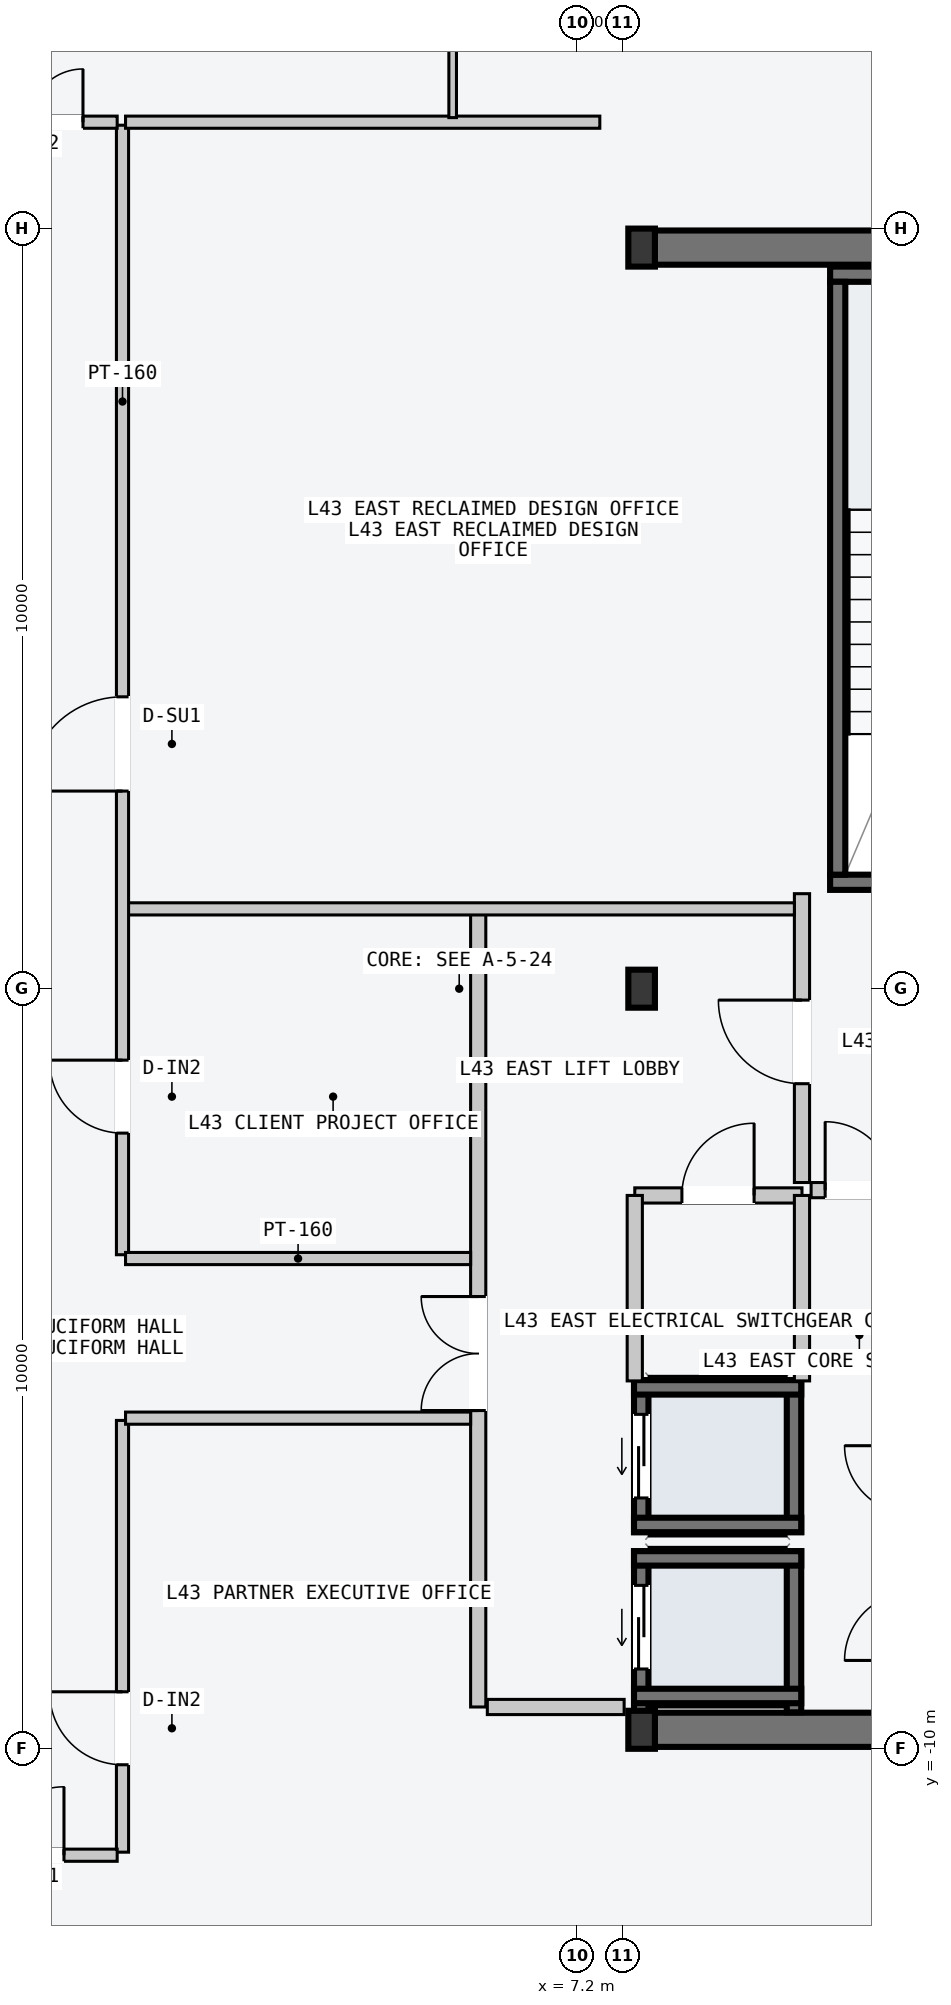
"""IFC4 building model, lengths in metres.
Left out: names, types, materials, properties, quantities, classifications, styles, units other than length and angle.
Written with IfcOpenShell. Run it as: python <this file> out.ifc"""

import sys

from ifc_helpers import new_model, si_unit, direction, frame, frame_2d, origin, origin_2d, place, context, subcontext, project, spatial, rectangle, i_section, extrude, element, fill, save


model = new_model("IFC4")
c1 = context("Model", 3, precision=1e-05, world=origin(), true_north=direction((0.0, 1.0)))
c2 = subcontext(c1, "Body", "Model", "MODEL_VIEW")
j1 = project(units=[si_unit("LENGTHUNIT", "METRE"), si_unit("PLANEANGLEUNIT", "RADIAN")], contexts=[c1])
p1 = place(None, origin())
s1 = spatial("IfcSite", under=j1, at=p1, CompositionType="ELEMENT")
p2 = place(p1, origin())
s2 = spatial("IfcBuilding", under=s1, at=p2, CompositionType="ELEMENT")
p3 = place(p2, frame((0.0, 0.0, 165.9)))
s3 = spatial("IfcBuildingStorey", under=s2, at=p3, CompositionType="ELEMENT", Elevation=165.9)
for number, where, z_axis, x_axis in (
    (1, (8.07, -9.75, -0.2), (0.0, 0.0, 1.0), (1.0, 0.0, 0.0)),
    (2, (8.07, 9.75, -0.2), (0.0, 0.0, 1.0), (1.0, 0.0, 0.0)),
):
    element("IfcWall", number, at=place(p3, frame(where, z_axis=z_axis, x_axis=x_axis)), inside=s3, PredefinedType="SHEAR", context=c2, shape_type="SweptSolid", body=[
        extrude(rectangle(XDim=6.46, YDim=0.45, at=frame_2d((3.23, 0.0))), origin(), (0.0, 0.0, 1.0), 3.6),
    ])
p4 = place(p3, frame((10.53, 1.4, -0.2), z_axis=(0.0, 0.0, 1.0), x_axis=(1.0, 0.0, 0.0)))
e3 = element("IfcWall", 3, at=p4, inside=s3, PredefinedType="SOLIDWALL", context=c2, shape_type="SweptSolid", body=[
    extrude(rectangle(XDim=3.72, YDim=0.2, at=frame_2d((1.86, 0.0))), origin(), (0.0, 0.0, 1.0), 3.6),
])
p5 = place(p4, frame((1.5, 0.0, 0.2)))
e4 = element("IfcOpeningElement", 4, at=p5, cuts=e3, PredefinedType="OPENING", context=c2, shape_type="SweptSolid", body=[
    extrude(rectangle(XDim=1.12, YDim=2.18, at=frame_2d((0.56, 1.09))), frame((0.0, 0.11, 0.0), z_axis=(0.0, -1.0, 0.0), x_axis=(1.0, 0.0, 0.0)), (0.0, 0.0, 1.0), 0.22),
])
p6 = place(p3, frame((10.53, 9.4, -0.2), z_axis=(0.0, 0.0, 1.0), x_axis=(1.0, 0.0, 0.0)))
e5 = element("IfcWall", 5, at=p6, inside=s3, PredefinedType="SOLIDWALL", context=c2, shape_type="SweptSolid", body=[
    extrude(rectangle(XDim=3.72, YDim=0.2, at=frame_2d((1.86, 0.0))), origin(), (0.0, 0.0, 1.0), 3.6),
])
p7 = place(p3, frame((10.63, 1.5, -0.2), z_axis=(0.0, 0.0, 1.0), x_axis=(0.0, 1.0, 0.0)))
e6 = element("IfcWall", 6, at=p7, inside=s3, PredefinedType="SOLIDWALL", context=c2, shape_type="SweptSolid", body=[
    extrude(rectangle(XDim=7.8, YDim=0.2, at=frame_2d((3.9, 0.0))), origin(), (0.0, 0.0, 1.0), 3.6),
])
for number, where, z_axis, x_axis in (
    (7, (8.05, -9.75, 0.0), (0.0, 0.0, 1.0), (1.0, 0.0, 0.0)),
    (8, (8.05, 0.0, 0.0), (0.0, 0.0, 1.0), (1.0, 0.0, 0.0)),
    (9, (8.05, 9.75, 0.0), (0.0, 0.0, 1.0), (1.0, 0.0, 0.0)),
):
    element("IfcColumn", number, at=place(p3, frame(where, z_axis=z_axis, x_axis=x_axis)), inside=s3, PredefinedType="COLUMN", context=c2, shape_type="SweptSolid", body=[
        extrude(i_section(OverallWidth=0.35, OverallDepth=0.5, WebThickness=0.02, FlangeThickness=0.032, at=origin_2d()), origin(), (0.0, 0.0, 1.0), 3.6),
    ])
p8 = place(p3, frame((8.045, -9.52, -0.2), z_axis=(0.0, 0.0, 1.0), x_axis=(0.0, 1.0, 0.0)))
e10 = element("IfcWall", 10, at=p8, inside=s3, PredefinedType="SOLIDWALL", context=c2, shape_type="SweptSolid", body=[
    extrude(rectangle(XDim=2.12, YDim=0.19, at=frame_2d((1.06, 0.0))), origin(), (0.0, 0.0, 1.0), 3.6),
])
p9 = place(p8, frame((0.57, 0.0, 0.2)))
e11 = element("IfcOpeningElement", 11, at=p9, cuts=e10, PredefinedType="OPENING", context=c2, shape_type="SweptSolid", body=[
    extrude(rectangle(XDim=1.1, YDim=2.2, at=frame_2d((0.55, 1.1))), frame((0.0, 0.105, 0.0), z_axis=(0.0, -1.0, 0.0), x_axis=(1.0, 0.0, 0.0)), (0.0, 0.0, 1.0), 0.21),
])
p10 = place(p3, frame((10.055, -9.52, -0.2), z_axis=(0.0, 0.0, 1.0), x_axis=(0.0, 1.0, 0.0)))
e12 = element("IfcWall", 12, at=p10, inside=s3, PredefinedType="SOLIDWALL", context=c2, shape_type="SweptSolid", body=[
    extrude(rectangle(XDim=2.12, YDim=0.19, at=frame_2d((1.06, 0.0))), origin(), (0.0, 0.0, 1.0), 3.6),
])
for number, where, z_axis, x_axis in (
    (13, (7.95, -7.495, -0.2), (0.0, 0.0, 1.0), (1.0, 0.0, 0.0)),
    (14, (7.95, -9.305, -0.2), (0.0, 0.0, 1.0), (1.0, 0.0, 0.0)),
):
    element("IfcWall", number, at=place(p3, frame(where, z_axis=z_axis, x_axis=x_axis)), inside=s3, PredefinedType="SOLIDWALL", context=c2, shape_type="SweptSolid", body=[
        extrude(rectangle(XDim=2.2, YDim=0.19, at=frame_2d((1.1, 0.0))), origin(), (0.0, 0.0, 1.0), 3.6),
    ])
p11 = place(p3, frame((8.045, -7.15, -0.2), z_axis=(0.0, 0.0, 1.0), x_axis=(0.0, 1.0, 0.0)))
e15 = element("IfcWall", 15, at=p11, inside=s3, PredefinedType="SOLIDWALL", context=c2, shape_type="SweptSolid", body=[
    extrude(rectangle(XDim=2.0, YDim=0.19, at=frame_2d((1.0, 0.0))), origin(), (0.0, 0.0, 1.0), 3.6),
])
p12 = place(p11, frame((0.45, 0.0, 0.2)))
e16 = element("IfcOpeningElement", 16, at=p12, cuts=e15, PredefinedType="OPENING", context=c2, shape_type="SweptSolid", body=[
    extrude(rectangle(XDim=1.1, YDim=2.2, at=frame_2d((0.55, 1.1))), frame((0.0, 0.105, 0.0), z_axis=(0.0, -1.0, 0.0), x_axis=(1.0, 0.0, 0.0)), (0.0, 0.0, 1.0), 0.21),
])
p13 = place(p3, frame((10.055, -7.15, -0.2), z_axis=(0.0, 0.0, 1.0), x_axis=(0.0, 1.0, 0.0)))
e17 = element("IfcWall", 17, at=p13, inside=s3, PredefinedType="SOLIDWALL", context=c2, shape_type="SweptSolid", body=[
    extrude(rectangle(XDim=2.0, YDim=0.19, at=frame_2d((1.0, 0.0))), origin(), (0.0, 0.0, 1.0), 3.6),
])
for number, where, z_axis, x_axis in (
    (18, (7.95, -5.245, -0.2), (0.0, 0.0, 1.0), (1.0, 0.0, 0.0)),
    (19, (7.95, -7.055, -0.2), (0.0, 0.0, 1.0), (1.0, 0.0, 0.0)),
):
    element("IfcWall", number, at=place(p3, frame(where, z_axis=z_axis, x_axis=x_axis)), inside=s3, PredefinedType="SOLIDWALL", context=c2, shape_type="SweptSolid", body=[
        extrude(rectangle(XDim=2.2, YDim=0.19, at=frame_2d((1.1, 0.0))), origin(), (0.0, 0.0, 1.0), 3.6),
    ])
p14 = place(p3, frame((5.9, -9.45, 0.0), z_axis=(0.0, 0.0, 1.0), x_axis=(0.0, 1.0, 0.0)))
e20 = element("IfcWall", 20, at=p14, inside=s3, PredefinedType="PARTITIONING", context=c2, shape_type="SweptSolid", body=[
    extrude(rectangle(XDim=10.5, YDim=0.2, at=frame_2d((5.25, 0.0))), origin(), (0.0, 0.0, 1.0), 3.4),
])
p15 = place(p14, frame((3.9, 0.0, 0.0)))
e21 = element("IfcOpeningElement", 21, at=p15, cuts=e20, PredefinedType="OPENING", context=c2, shape_type="SweptSolid", body=[
    extrude(rectangle(XDim=1.5, YDim=2.2, at=frame_2d((0.75, 1.1))), frame((0.0, 0.11, 0.0), z_axis=(0.0, -1.0, 0.0), x_axis=(1.0, 0.0, 0.0)), (0.0, 0.0, 1.0), 0.22),
])
p16 = place(p3, frame((6.02, -9.45, 0.0), z_axis=(0.0, 0.0, 1.0), x_axis=(1.0, 0.0, 0.0)))
e22 = element("IfcWall", 22, at=p16, inside=s3, PredefinedType="PARTITIONING", context=c2, shape_type="SweptSolid", body=[
    extrude(rectangle(XDim=1.8, YDim=0.2, at=frame_2d((0.9, 0.0))), origin(), (0.0, 0.0, 1.0), 3.4),
])
p17 = place(p3, frame((10.16, -2.55, 0.0), z_axis=(0.0, 0.0, 1.0), x_axis=(0.0, 1.0, 0.0)))
e23 = element("IfcWall", 23, at=p17, inside=s3, PredefinedType="PARTITIONING", context=c2, shape_type="SweptSolid", body=[
    extrude(rectangle(XDim=3.8, YDim=0.2, at=frame_2d((1.9, 0.0))), origin(), (0.0, 0.0, 1.0), 3.4),
])
p18 = place(p17, frame((1.3, 0.0, 0.0)))
e24 = element("IfcOpeningElement", 24, at=p18, cuts=e23, PredefinedType="OPENING", context=c2, shape_type="SweptSolid", body=[
    extrude(rectangle(XDim=1.1, YDim=2.15, at=frame_2d((0.55, 1.075))), frame((0.0, 0.11, 0.0), z_axis=(0.0, -1.0, 0.0), x_axis=(1.0, 0.0, 0.0)), (0.0, 0.0, 1.0), 0.22),
])
p19 = place(p3, frame((10.28, -2.65, 0.0), z_axis=(0.0, 0.0, 1.0), x_axis=(1.0, 0.0, 0.0)))
e25 = element("IfcWall", 25, at=p19, inside=s3, PredefinedType="PARTITIONING", context=c2, shape_type="SweptSolid", body=[
    extrude(rectangle(XDim=1.27, YDim=0.2, at=frame_2d((0.635, 0.0))), origin(), (0.0, 0.0, 1.0), 3.4),
])
p20 = place(p19, frame((0.185, 0.0, 0.0)))
e26 = element("IfcOpeningElement", 26, at=p20, cuts=e25, PredefinedType="OPENING", context=c2, shape_type="SweptSolid", body=[
    extrude(rectangle(XDim=0.9, YDim=2.15, at=frame_2d((0.45, 1.075))), frame((0.0, 0.11, 0.0), z_axis=(0.0, -1.0, 0.0), x_axis=(1.0, 0.0, 0.0)), (0.0, 0.0, 1.0), 0.22),
])
p21 = place(p3, frame((7.96, -2.72, 0.0), z_axis=(0.0, 0.0, 1.0), x_axis=(1.0, 0.0, 0.0)))
e27 = element("IfcWall", 27, at=p21, inside=s3, PredefinedType="PARTITIONING", context=c2, shape_type="SweptSolid", body=[
    extrude(rectangle(XDim=2.2, YDim=0.2, at=frame_2d((1.1, 0.0))), origin(), (0.0, 0.0, 1.0), 3.4),
])
p22 = place(p21, frame((0.62, 0.0, 0.0)))
e28 = element("IfcOpeningElement", 28, at=p22, cuts=e27, PredefinedType="OPENING", context=c2, shape_type="SweptSolid", body=[
    extrude(rectangle(XDim=0.95, YDim=2.1, at=frame_2d((0.475, 1.05))), frame((0.0, 0.11, 0.0), z_axis=(0.0, -1.0, 0.0), x_axis=(1.0, 0.0, 0.0)), (0.0, 0.0, 1.0), 0.22),
])
for number, where, z_axis, x_axis in (
    (29, (7.96, -5.16, 0.0), (0.0, 0.0, 1.0), (0.0, 1.0, 0.0)),
    (30, (10.16, -5.16, 0.0), (0.0, 0.0, 1.0), (0.0, 1.0, 0.0)),
):
    element("IfcWall", number, at=place(p3, frame(where, z_axis=z_axis, x_axis=x_axis)), inside=s3, PredefinedType="PARTITIONING", context=c2, shape_type="SweptSolid", body=[
        extrude(rectangle(XDim=2.44, YDim=0.2, at=frame_2d((1.22, 0.0))), origin(), (0.0, 0.0, 1.0), 3.4),
    ])
p23 = place(p3, frame((1.26, 1.05, 0.0), z_axis=(0.0, 0.0, 1.0), x_axis=(1.0, 0.0, 0.0)))
e31 = element("IfcWall", 31, at=p23, inside=s3, PredefinedType="PARTITIONING", context=c2, shape_type="SweptSolid", body=[
    extrude(rectangle(XDim=8.8, YDim=0.16, at=frame_2d((4.4, 0.0))), origin(), (0.0, 0.0, 1.0), 3.4),
])
p24 = place(p3, frame((1.22, -3.5, 0.0), z_axis=(0.0, 0.0, 1.0), x_axis=(0.0, 1.0, 0.0)))
e32 = element("IfcWall", 32, at=p24, inside=s3, PredefinedType="PARTITIONING", context=c2, shape_type="SweptSolid", body=[
    extrude(rectangle(XDim=14.86, YDim=0.16, at=frame_2d((7.43, 0.0))), origin(), (0.0, 0.0, 1.0), 3.4),
])
p25 = place(p24, frame((6.1, 0.0, 0.0)))
e33 = element("IfcOpeningElement", 33, at=p25, cuts=e32, PredefinedType="OPENING", context=c2, shape_type="SweptSolid", body=[
    extrude(rectangle(XDim=1.24, YDim=2.24, at=frame_2d((0.62, 1.12))), frame((0.0, 0.09, 0.0), z_axis=(0.0, -1.0, 0.0), x_axis=(1.0, 0.0, 0.0)), (0.0, 0.0, 1.0), 0.18),
])
p26 = place(p24, frame((1.6, 0.0, 0.0)))
e34 = element("IfcOpeningElement", 34, at=p26, cuts=e32, PredefinedType="OPENING", context=c2, shape_type="SweptSolid", body=[
    extrude(rectangle(XDim=0.96, YDim=2.18, at=frame_2d((0.48, 1.09))), frame((0.0, 0.09, 0.0), z_axis=(0.0, -1.0, 0.0), x_axis=(1.0, 0.0, 0.0)), (0.0, 0.0, 1.0), 0.18),
])
p27 = place(p3, frame((1.26, 11.4, 0.0), z_axis=(0.0, 0.0, 1.0), x_axis=(1.0, 0.0, 0.0)))
e35 = element("IfcWall", 35, at=p27, inside=s3, PredefinedType="PARTITIONING", context=c2, shape_type="SweptSolid", body=[
    extrude(rectangle(XDim=6.24, YDim=0.16, at=frame_2d((3.12, 0.0))), origin(), (0.0, 0.0, 1.0), 3.4),
])
p28 = place(p3, frame((1.26, -3.55, 0.0), z_axis=(0.0, 0.0, 1.0), x_axis=(1.0, 0.0, 0.0)))
e36 = element("IfcWall", 36, at=p28, inside=s3, PredefinedType="PARTITIONING", context=c2, shape_type="SweptSolid", body=[
    extrude(rectangle(XDim=4.54, YDim=0.16, at=frame_2d((2.27, 0.0))), origin(), (0.0, 0.0, 1.0), 3.4),
])
p29 = place(p3, frame((1.22, -11.36, 0.0), z_axis=(0.0, 0.0, 1.0), x_axis=(0.0, 1.0, 0.0)))
e37 = element("IfcWall", 37, at=p29, inside=s3, PredefinedType="PARTITIONING", context=c2, shape_type="SweptSolid", body=[
    extrude(rectangle(XDim=5.68, YDim=0.16, at=frame_2d((2.84, 0.0))), origin(), (0.0, 0.0, 1.0), 3.4),
])
p30 = place(p29, frame((1.15, 0.0, 0.0)))
e38 = element("IfcOpeningElement", 38, at=p30, cuts=e37, PredefinedType="OPENING", context=c2, shape_type="SweptSolid", body=[
    extrude(rectangle(XDim=0.96, YDim=2.18, at=frame_2d((0.48, 1.09))), frame((0.0, 0.09, 0.0), z_axis=(0.0, -1.0, 0.0), x_axis=(1.0, 0.0, 0.0)), (0.0, 0.0, 1.0), 0.18),
])
p31 = place(p3, frame((1.26, -5.65, 0.0), z_axis=(0.0, 0.0, 1.0), x_axis=(1.0, 0.0, 0.0)))
e39 = element("IfcWall", 39, at=p31, inside=s3, PredefinedType="PARTITIONING", context=c2, shape_type="SweptSolid", body=[
    extrude(rectangle(XDim=4.54, YDim=0.16, at=frame_2d((2.27, 0.0))), origin(), (0.0, 0.0, 1.0), 3.4),
])
p32 = place(p3, frame((5.564, 11.46, 0.0), z_axis=(0.0, 0.0, 1.0), x_axis=(0.0, 1.0, 0.0)))
e40 = element("IfcWall", 40, at=p32, inside=s3, PredefinedType="PARTITIONING", context=c2, shape_type="SweptSolid", body=[
    extrude(rectangle(XDim=7.1, YDim=0.1, at=frame_2d((3.55, 0.0))), origin(), (0.0, 0.0, 1.0), 3.4),
])
p33 = place(p32, frame((1.15, 0.0, 0.0)))
e41 = element("IfcOpeningElement", 41, at=p33, cuts=e40, PredefinedType="OPENING", context=c2, shape_type="SweptSolid", body=[
    extrude(rectangle(XDim=0.96, YDim=2.18, at=frame_2d((0.48, 1.09))), frame((0.0, 0.06, 0.0), z_axis=(0.0, -1.0, 0.0), x_axis=(1.0, 0.0, 0.0)), (0.0, 0.0, 1.0), 0.12),
])
p34 = place(p3, frame((-1.15, 11.4, 0.0), z_axis=(0.0, 0.0, 1.0), x_axis=(1.0, 0.0, 0.0)))
e42 = element("IfcWall", 42, at=p34, inside=s3, PredefinedType="PARTITIONING", context=c2, shape_type="SweptSolid", body=[
    extrude(rectangle(XDim=2.3, YDim=0.16, at=frame_2d((1.15, 0.0))), origin(), (0.0, 0.0, 1.0), 3.4),
])
p35 = place(p34, frame((0.45, 0.0, 0.0)))
e43 = element("IfcOpeningElement", 43, at=p35, cuts=e42, PredefinedType="OPENING", context=c2, shape_type="SweptSolid", body=[
    extrude(rectangle(XDim=1.4, YDim=2.2, at=frame_2d((0.7, 1.1))), frame((0.0, 0.09, 0.0), z_axis=(0.0, -1.0, 0.0), x_axis=(1.0, 0.0, 0.0)), (0.0, 0.0, 1.0), 0.18),
])
p36 = place(p3, frame((-1.15, -11.4, 0.0), z_axis=(0.0, 0.0, 1.0), x_axis=(1.0, 0.0, 0.0)))
e44 = element("IfcWall", 44, at=p36, inside=s3, PredefinedType="PARTITIONING", context=c2, shape_type="SweptSolid", body=[
    extrude(rectangle(XDim=2.3, YDim=0.16, at=frame_2d((1.15, 0.0))), origin(), (0.0, 0.0, 1.0), 3.4),
])
p37 = place(p36, frame((0.7, 0.0, 0.0)))
e45 = element("IfcOpeningElement", 45, at=p37, cuts=e44, PredefinedType="OPENING", context=c2, shape_type="SweptSolid", body=[
    extrude(rectangle(XDim=0.9, YDim=2.15, at=frame_2d((0.45, 1.075))), frame((0.0, 0.09, 0.0), z_axis=(0.0, -1.0, 0.0), x_axis=(1.0, 0.0, 0.0)), (0.0, 0.0, 1.0), 0.18),
])
p38 = place(p9, origin())
e46 = element("IfcDoor", 46, at=p38, inside=s3, OperationType="SLIDING_TO_LEFT", PredefinedType="DOOR", context=c2, shape_type="SweptSolid", body=[
    extrude(rectangle(XDim=1.1, YDim=2.2, at=frame_2d((0.55, 1.1))), frame((0.0, 0.025, 0.0), z_axis=(0.0, -1.0, 0.0), x_axis=(1.0, 0.0, 0.0)), (0.0, 0.0, 1.0), 0.05),
])
fill(e11, e46)
p39 = place(p12, origin())
e47 = element("IfcDoor", 47, at=p39, inside=s3, OperationType="SLIDING_TO_LEFT", PredefinedType="DOOR", context=c2, shape_type="SweptSolid", body=[
    extrude(rectangle(XDim=1.1, YDim=2.2, at=frame_2d((0.55, 1.1))), frame((0.0, 0.025, 0.0), z_axis=(0.0, -1.0, 0.0), x_axis=(1.0, 0.0, 0.0)), (0.0, 0.0, 1.0), 0.05),
])
fill(e16, e47)
p40 = place(p15, origin())
e48 = element("IfcDoor", 48, at=p40, inside=s3, OperationType="DOUBLE_DOOR_SINGLE_SWING", PredefinedType="DOOR", context=c2, shape_type="SweptSolid", body=[
    extrude(rectangle(XDim=1.5, YDim=2.2, at=frame_2d((0.75, 1.1))), frame((0.0, 0.025, 0.0), z_axis=(0.0, -1.0, 0.0), x_axis=(1.0, 0.0, 0.0)), (0.0, 0.0, 1.0), 0.05),
])
fill(e21, e48)
p41 = place(p18, origin())
e49 = element("IfcDoor", 49, at=p41, inside=s3, OperationType="SINGLE_SWING_RIGHT", PredefinedType="DOOR", context=c2, shape_type="SweptSolid", body=[
    extrude(rectangle(XDim=1.1, YDim=2.15, at=frame_2d((0.55, 1.075))), frame((0.0, 0.025, 0.0), z_axis=(0.0, -1.0, 0.0), x_axis=(1.0, 0.0, 0.0)), (0.0, 0.0, 1.0), 0.05),
])
fill(e24, e49)
p42 = place(p20, origin())
e50 = element("IfcDoor", 50, at=p42, inside=s3, OperationType="SINGLE_SWING_LEFT", PredefinedType="DOOR", context=c2, shape_type="SweptSolid", body=[
    extrude(rectangle(XDim=0.9, YDim=2.15, at=frame_2d((0.45, 1.075))), frame((0.0, 0.025, 0.0), z_axis=(0.0, -1.0, 0.0), x_axis=(1.0, 0.0, 0.0)), (0.0, 0.0, 1.0), 0.05),
])
fill(e26, e50)
p43 = place(p22, origin())
e51 = element("IfcDoor", 51, at=p43, inside=s3, OperationType="SINGLE_SWING_RIGHT", PredefinedType="DOOR", context=c2, shape_type="SweptSolid", body=[
    extrude(rectangle(XDim=0.95, YDim=2.1, at=frame_2d((0.475, 1.05))), frame((0.0, 0.025, 0.0), z_axis=(0.0, -1.0, 0.0), x_axis=(1.0, 0.0, 0.0)), (0.0, 0.0, 1.0), 0.05),
])
fill(e28, e51)
p44 = place(p25, origin())
e52 = element("IfcDoor", 52, at=p44, inside=s3, OperationType="SINGLE_SWING_LEFT", PredefinedType="DOOR", context=c2, shape_type="SweptSolid", body=[
    extrude(rectangle(XDim=1.24, YDim=2.24, at=frame_2d((0.62, 1.12))), frame((0.0, 0.025, 0.0), z_axis=(0.0, -1.0, 0.0), x_axis=(1.0, 0.0, 0.0)), (0.0, 0.0, 1.0), 0.05),
])
fill(e33, e52)
p45 = place(p26, origin())
e53 = element("IfcDoor", 53, at=p45, inside=s3, OperationType="SINGLE_SWING_RIGHT", PredefinedType="DOOR", context=c2, shape_type="SweptSolid", body=[
    extrude(rectangle(XDim=0.96, YDim=2.18, at=frame_2d((0.48, 1.09))), frame((0.0, 0.025, 0.0), z_axis=(0.0, -1.0, 0.0), x_axis=(1.0, 0.0, 0.0)), (0.0, 0.0, 1.0), 0.05),
])
fill(e34, e53)
p46 = place(p30, origin())
e54 = element("IfcDoor", 54, at=p46, inside=s3, OperationType="SINGLE_SWING_RIGHT", PredefinedType="DOOR", context=c2, shape_type="SweptSolid", body=[
    extrude(rectangle(XDim=0.96, YDim=2.18, at=frame_2d((0.48, 1.09))), frame((0.0, 0.025, 0.0), z_axis=(0.0, -1.0, 0.0), x_axis=(1.0, 0.0, 0.0)), (0.0, 0.0, 1.0), 0.05),
])
fill(e38, e54)
p47 = place(p35, origin())
e55 = element("IfcDoor", 55, at=p47, inside=s3, OperationType="DOUBLE_DOOR_SINGLE_SWING", PredefinedType="DOOR", context=c2, shape_type="SweptSolid", body=[
    extrude(rectangle(XDim=1.4, YDim=2.2, at=frame_2d((0.7, 1.1))), frame((0.0, 0.025, 0.0), z_axis=(0.0, -1.0, 0.0), x_axis=(1.0, 0.0, 0.0)), (0.0, 0.0, 1.0), 0.05),
])
fill(e43, e55)
p48 = place(p37, origin())
e56 = element("IfcDoor", 56, at=p48, inside=s3, OperationType="SINGLE_SWING_RIGHT", PredefinedType="DOOR", context=c2, shape_type="SweptSolid", body=[
    extrude(rectangle(XDim=0.9, YDim=2.15, at=frame_2d((0.45, 1.075))), frame((0.0, 0.025, 0.0), z_axis=(0.0, -1.0, 0.0), x_axis=(1.0, 0.0, 0.0)), (0.0, 0.0, 1.0), 0.05),
])
fill(e45, e56)
save(model, sys.argv[1])
